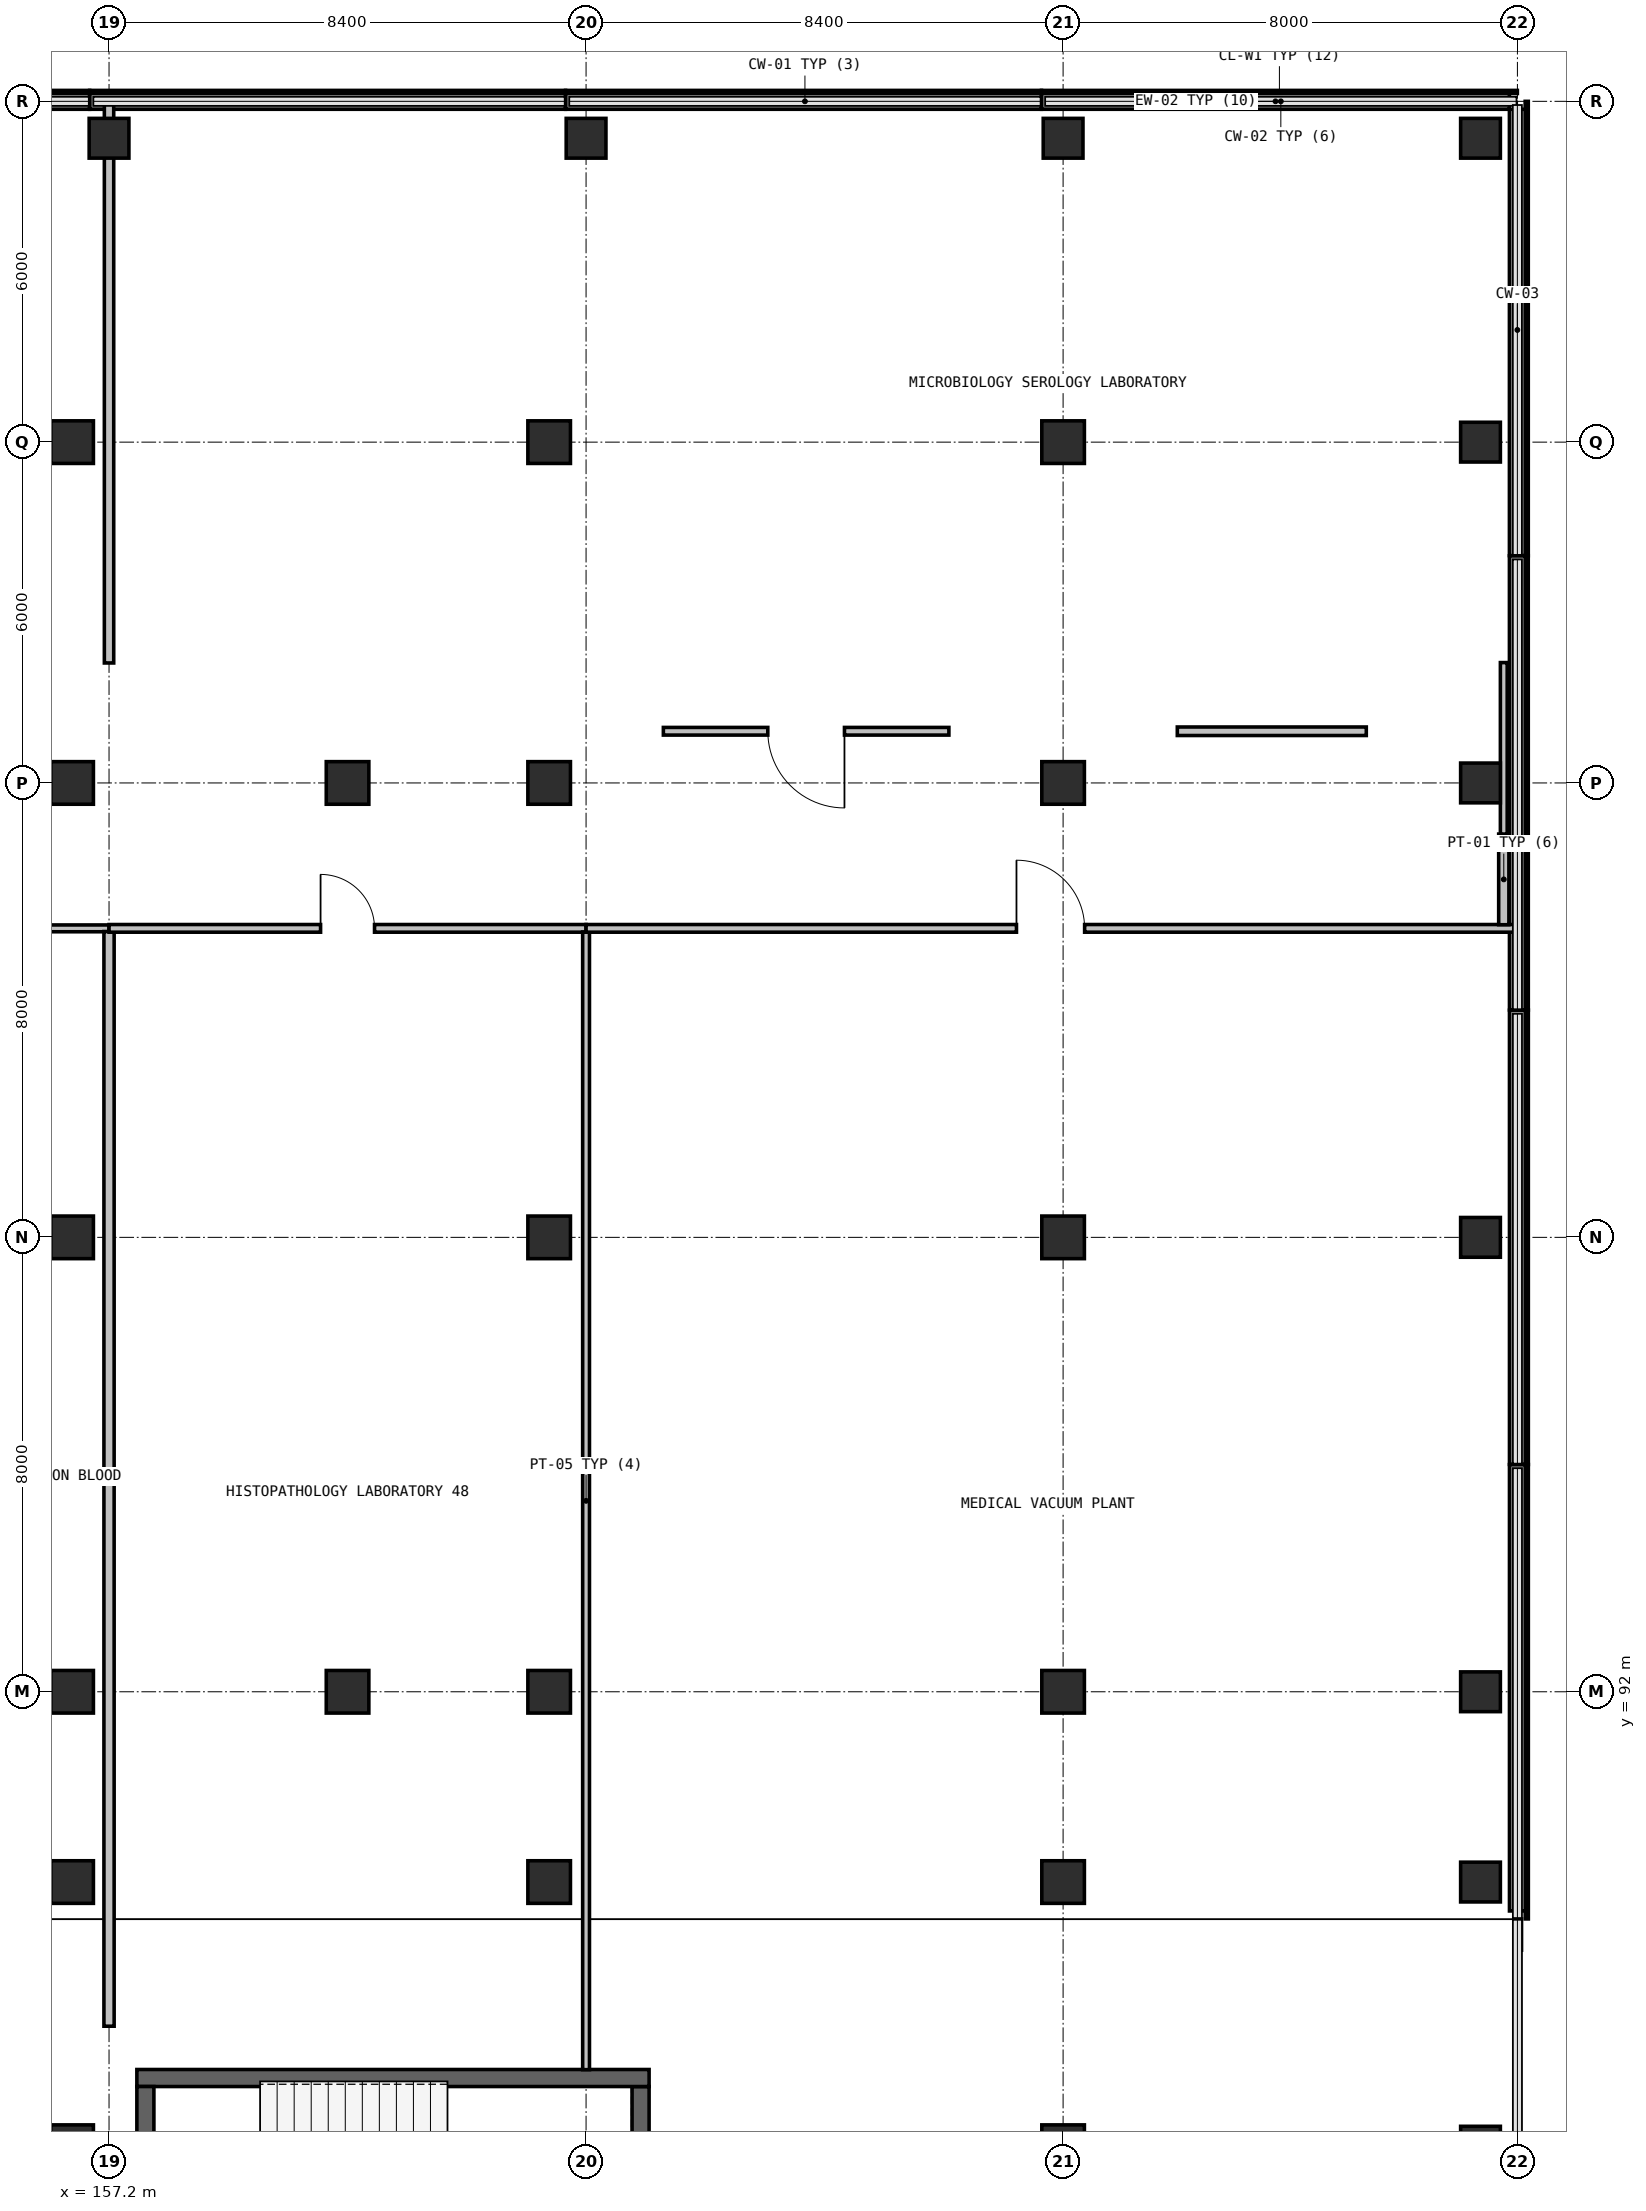
"""IFC4 building model, lengths in metres.
Left out: names, types, materials, properties, quantities, classifications, styles, units other than length and angle.
Written with IfcOpenShell. Run it as: python <this file> out.ifc"""

import sys

from ifc_helpers import new_model, si_unit, direction, frame, frame_2d, origin, origin_2d, place, context, subcontext, project, spatial, rectangle, extrude, element, fill, save


model = new_model("IFC4")
c1 = context("Model", 3, precision=1e-05, world=origin(), true_north=direction((0.0, 1.0)))
c2 = subcontext(c1, "Body", "Model", "MODEL_VIEW")
j1 = project(units=[si_unit("LENGTHUNIT", "METRE"), si_unit("PLANEANGLEUNIT", "RADIAN")], contexts=[c1])
p1 = place(None, origin())
s1 = spatial("IfcSite", under=j1, at=p1, CompositionType="ELEMENT")
p2 = place(p1, origin())
s2 = spatial("IfcBuilding", under=s1, at=p2, CompositionType="ELEMENT")
p3 = place(p2, frame((0.0, 0.0, 15.0)))
s3 = spatial("IfcBuildingStorey", under=s2, at=p3, CompositionType="ELEMENT", Elevation=15.0)
for number, where, z_axis, x_axis in (
    (1, (161.4, 92.0, 0.0), (0.0, 0.0, 1.0), (1.0, 0.0, 0.0)),
    (2, (161.4, 108.0, 0.0), (0.0, 0.0, 1.0), (1.0, 0.0, 0.0)),
):
    element("IfcColumn", number, at=place(p3, frame(where, z_axis=z_axis, x_axis=x_axis)), inside=s3, PredefinedType="COLUMN", context=c2, shape_type="SweptSolid", body=[
        extrude(rectangle(XDim=0.75, YDim=0.75, at=origin_2d()), origin(), (0.0, 0.0, 1.0), 4.2),
    ])
for number, where, z_axis, x_axis in (
    (3, (157.2, 119.35, 0.0), (0.0, 0.0, 1.0), (1.0, 0.0, 0.0)),
    (4, (165.6, 119.35, 0.0), (0.0, 0.0, 1.0), (1.0, 0.0, 0.0)),
    (5, (174.0, 119.35, 0.0), (0.0, 0.0, 1.0), (1.0, 0.0, 0.0)),
    (6, (181.35, 119.35, 0.0), (0.0, 0.0, 1.0), (1.0, 0.0, 0.0)),
):
    element("IfcColumn", number, at=place(p3, frame(where, z_axis=z_axis, x_axis=x_axis)), inside=s3, PredefinedType="COLUMN", context=c2, shape_type="SweptSolid", body=[
        extrude(rectangle(XDim=0.7, YDim=0.7, at=origin_2d()), origin(), (0.0, 0.0, 1.0), 4.2),
    ])
for number, where, z_axis, x_axis in (
    (7, (156.55, 84.0, 0.0), (0.0, 0.0, 1.0), (1.0, 0.0, 0.0)),
    (8, (156.55, 88.65, 0.0), (0.0, 0.0, 1.0), (1.0, 0.0, 0.0)),
    (9, (156.55, 92.0, 0.0), (0.0, 0.0, 1.0), (1.0, 0.0, 0.0)),
    (10, (156.55, 100.0, 0.0), (0.0, 0.0, 1.0), (1.0, 0.0, 0.0)),
    (11, (156.55, 108.0, 0.0), (0.0, 0.0, 1.0), (1.0, 0.0, 0.0)),
    (12, (156.55, 114.0, 0.0), (0.0, 0.0, 1.0), (1.0, 0.0, 0.0)),
    (13, (164.95, 88.65, 0.0), (0.0, 0.0, 1.0), (1.0, 0.0, 0.0)),
    (14, (164.95, 92.0, 0.0), (0.0, 0.0, 1.0), (1.0, 0.0, 0.0)),
    (15, (164.95, 100.0, 0.0), (0.0, 0.0, 1.0), (1.0, 0.0, 0.0)),
    (16, (164.95, 108.0, 0.0), (0.0, 0.0, 1.0), (1.0, 0.0, 0.0)),
    (17, (164.95, 114.0, 0.0), (0.0, 0.0, 1.0), (1.0, 0.0, 0.0)),
    (18, (174.0, 84.0, 0.0), (0.0, 0.0, 1.0), (1.0, 0.0, 0.0)),
    (19, (174.0, 88.65, 0.0), (0.0, 0.0, 1.0), (1.0, 0.0, 0.0)),
    (20, (174.0, 92.0, 0.0), (0.0, 0.0, 1.0), (1.0, 0.0, 0.0)),
    (21, (174.0, 100.0, 0.0), (0.0, 0.0, 1.0), (1.0, 0.0, 0.0)),
    (22, (174.0, 108.0, 0.0), (0.0, 0.0, 1.0), (1.0, 0.0, 0.0)),
    (23, (174.0, 114.0, 0.0), (0.0, 0.0, 1.0), (1.0, 0.0, 0.0)),
):
    element("IfcColumn", number, at=place(p3, frame(where, z_axis=z_axis, x_axis=x_axis)), inside=s3, PredefinedType="COLUMN", context=c2, shape_type="SweptSolid", body=[
        extrude(rectangle(XDim=0.75, YDim=0.75, at=origin_2d()), origin(), (0.0, 0.0, 1.0), 4.2),
    ])
for number, where, z_axis, x_axis in (
    (24, (181.35, 84.0, 0.0), (0.0, 0.0, 1.0), (1.0, 0.0, 0.0)),
    (25, (181.35, 88.65, 0.0), (0.0, 0.0, 1.0), (1.0, 0.0, 0.0)),
    (26, (181.35, 92.0, 0.0), (0.0, 0.0, 1.0), (1.0, 0.0, 0.0)),
    (27, (181.35, 100.0, 0.0), (0.0, 0.0, 1.0), (1.0, 0.0, 0.0)),
    (28, (181.35, 108.0, 0.0), (0.0, 0.0, 1.0), (1.0, 0.0, 0.0)),
    (29, (181.35, 114.0, 0.0), (0.0, 0.0, 1.0), (1.0, 0.0, 0.0)),
):
    element("IfcColumn", number, at=place(p3, frame(where, z_axis=z_axis, x_axis=x_axis)), inside=s3, PredefinedType="COLUMN", context=c2, shape_type="SweptSolid", body=[
        extrude(rectangle(XDim=0.7, YDim=0.7, at=origin_2d()), origin(), (0.0, 0.0, 1.0), 4.2),
    ])
for number, where, z_axis, x_axis in (
    (30, (148.481, 120.0, 0.0), (0.0, 0.0, 1.0), (1.0, 0.0, 0.0)),
    (31, (156.861, 120.0, 0.0), (0.0, 0.0, 1.0), (1.0, 0.0, 0.0)),
    (32, (165.241, 120.0, 0.0), (0.0, 0.0, 1.0), (1.0, 0.0, 0.0)),
):
    element("IfcWall", number, at=place(p3, frame(where, z_axis=z_axis, x_axis=x_axis)), inside=s3, PredefinedType="SOLIDWALL", context=c2, shape_type="SweptSolid", body=[
        extrude(rectangle(XDim=8.376, YDim=0.28, at=frame_2d((4.188, 0.0))), origin(), (0.0, 0.0, 1.0), 0.94),
    ])
p4 = place(p3, frame((173.621, 120.0, 0.0), z_axis=(0.0, 0.0, 1.0), x_axis=(1.0, 0.0, 0.0)))
e33 = element("IfcWall", 33, at=p4, inside=s3, PredefinedType="SOLIDWALL", context=c2, shape_type="SweptSolid", body=[
    extrude(rectangle(XDim=8.238, YDim=0.28, at=frame_2d((4.119, 0.0))), origin(), (0.0, 0.0, 1.0), 0.94),
])
p5 = place(p3, frame((181.999, 119.86, 0.0), z_axis=(0.0, 0.0, 1.0), x_axis=(0.0, -1.0, 0.0)))
e34 = element("IfcWall", 34, at=p5, inside=s3, PredefinedType="SOLIDWALL", context=c2, shape_type="SweptSolid", body=[
    extrude(rectangle(XDim=7.858, YDim=0.28, at=frame_2d((3.929, 0.0))), origin(), (0.0, 0.0, 1.0), 0.94),
])
p6 = place(p3, frame((181.999, 111.998, 0.0), z_axis=(0.0, 0.0, 1.0), x_axis=(0.000122144863, -0.99999999254, 0.0)))
e35 = element("IfcWall", 35, at=p6, inside=s3, PredefinedType="SOLIDWALL", context=c2, shape_type="SweptSolid", body=[
    extrude(rectangle(XDim=7.995, YDim=0.28, at=frame_2d((3.998, 0.0))), origin(), (0.0, 0.0, 1.0), 0.94),
])
p7 = place(p3, frame((182.0, 103.999, 0.0), z_axis=(0.0, 0.0, 1.0), x_axis=(0.0, -1.0, 0.0)))
e36 = element("IfcWall", 36, at=p7, inside=s3, PredefinedType="SOLIDWALL", context=c2, shape_type="SweptSolid", body=[
    extrude(rectangle(XDim=7.996, YDim=0.28, at=frame_2d((3.998, 0.0))), origin(), (0.0, 0.0, 1.0), 0.94),
])
p8 = place(p3, frame((182.0, 95.999, 0.0), z_axis=(0.0, 0.0, 1.0), x_axis=(0.0, -1.0, 0.0)))
e37 = element("IfcWall", 37, at=p8, inside=s3, PredefinedType="SOLIDWALL", context=c2, shape_type="SweptSolid", body=[
    extrude(rectangle(XDim=7.858, YDim=0.28, at=frame_2d((3.929, 0.0))), origin(), (0.0, 0.0, 1.0), 0.94),
])
p9 = place(p3, frame((166.56, 81.19, 0.0), z_axis=(0.0, 0.0, 1.0), x_axis=(0.0, 1.0, 0.0)))
e38 = element("IfcWall", 38, at=p9, inside=s3, PredefinedType="SHEAR", context=c2, shape_type="SweptSolid", body=[
    extrude(rectangle(XDim=3.86, YDim=0.3, at=frame_2d((1.93, 0.0))), origin(), (0.0, 0.0, 1.0), 3.895),
])
p10 = place(p3, frame((166.71, 85.2, 0.0), z_axis=(0.0, 0.0, 1.0), x_axis=(-1.0, 0.0, 0.0)))
e39 = element("IfcWall", 39, at=p10, inside=s3, PredefinedType="SHEAR", context=c2, shape_type="SweptSolid", body=[
    extrude(rectangle(XDim=9.02, YDim=0.3, at=frame_2d((4.51, 0.0))), origin(), (0.0, 0.0, 1.0), 3.895),
])
p11 = place(p3, frame((157.84, 85.05, 0.0), z_axis=(0.0, 0.0, 1.0), x_axis=(0.0, -1.0, 0.0)))
e40 = element("IfcWall", 40, at=p11, inside=s3, PredefinedType="SHEAR", context=c2, shape_type="SweptSolid", body=[
    extrude(rectangle(XDim=3.86, YDim=0.3, at=frame_2d((1.93, 0.0))), origin(), (0.0, 0.0, 1.0), 3.895),
])
p12 = place(p11, frame((1.38, 0.0, 0.0)))
e41 = element("IfcOpeningElement", 41, at=p12, cuts=e40, PredefinedType="OPENING", context=c2, shape_type="SweptSolid", body=[
    extrude(rectangle(XDim=1.1, YDim=2.15, at=frame_2d((0.55, 1.075))), frame((0.0, 0.16, 0.0), z_axis=(0.0, -1.0, 0.0), x_axis=(1.0, 0.0, 0.0)), (0.0, 0.0, 1.0), 0.32),
])
p13 = place(p3, frame((153.724, 105.44, 0.0), z_axis=(0.0, 0.0, 1.0), x_axis=(1.0, 0.0, 0.0)))
e42 = element("IfcWall", 42, at=p13, inside=s3, PredefinedType="PARTITIONING", context=c2, shape_type="SweptSolid", body=[
    extrude(rectangle(XDim=3.476, YDim=0.12, at=frame_2d((1.738, 0.0))), origin(), (0.0, 0.0, 1.0), 3.895),
])
p14 = place(p13, frame((1.113, 0.0, 0.0)))
e43 = element("IfcOpeningElement", 43, at=p14, cuts=e42, PredefinedType="OPENING", context=c2, shape_type="SweptSolid", body=[
    extrude(rectangle(XDim=1.25, YDim=2.15, at=frame_2d((0.625, 1.075))), frame((0.0, 0.07, 0.0), z_axis=(0.0, -1.0, 0.0), x_axis=(1.0, 0.0, 0.0)), (0.0, 0.0, 1.0), 0.14),
])
p15 = place(p3, frame((157.2, 105.384, 0.0), z_axis=(0.0, 0.0, 1.0), x_axis=(0.0, -1.0, 0.0)))
e44 = element("IfcWall", 44, at=p15, inside=s3, PredefinedType="PARTITIONING", context=c2, shape_type="SweptSolid", body=[
    extrude(rectangle(XDim=19.272, YDim=0.18, at=frame_2d((9.636, 0.0))), origin(), (0.0, 0.0, 1.0), 3.895),
])
p16 = place(p3, frame((157.2, 105.44, 0.0), z_axis=(0.0, 0.0, 1.0), x_axis=(1.0, 0.0, 0.0)))
e45 = element("IfcWall", 45, at=p16, inside=s3, PredefinedType="PARTITIONING", context=c2, shape_type="SweptSolid", body=[
    extrude(rectangle(XDim=8.4, YDim=0.135, at=frame_2d((4.2, 0.0))), origin(), (0.0, 0.0, 1.0), 3.895),
])
p17 = place(p16, frame((3.725, 0.0, 0.0)))
e46 = element("IfcOpeningElement", 46, at=p17, cuts=e45, PredefinedType="OPENING", context=c2, shape_type="SweptSolid", body=[
    extrude(rectangle(XDim=0.95, YDim=2.1, at=frame_2d((0.475, 1.05))), frame((0.0, 0.077, 0.0), z_axis=(0.0, -1.0, 0.0), x_axis=(1.0, 0.0, 0.0)), (0.0, 0.0, 1.0), 0.155),
])
p18 = place(p3, frame((165.6, 105.376, 0.0), z_axis=(0.0, 0.0, 1.0), x_axis=(0.0, -1.0, 0.0)))
e47 = element("IfcWall", 47, at=p18, inside=s3, PredefinedType="PARTITIONING", context=c2, shape_type="SweptSolid", body=[
    extrude(rectangle(XDim=20.029, YDim=0.12, at=frame_2d((10.015, 0.0))), origin(), (0.0, 0.0, 1.0), 3.895),
])
p19 = place(p3, frame((165.6, 105.44, 0.0), z_axis=(0.0, 0.0, 1.0), x_axis=(1.0, 0.0, 0.0)))
e48 = element("IfcWall", 48, at=p19, inside=s3, PredefinedType="PARTITIONING", context=c2, shape_type="SweptSolid", body=[
    extrude(rectangle(XDim=16.358, YDim=0.135, at=frame_2d((8.179, 0.0))), origin(), (0.0, 0.0, 1.0), 3.895),
])
p20 = place(p19, frame((7.579, 0.0, 0.0)))
e49 = element("IfcOpeningElement", 49, at=p20, cuts=e48, PredefinedType="OPENING", context=c2, shape_type="SweptSolid", body=[
    extrude(rectangle(XDim=1.2, YDim=2.15, at=frame_2d((0.6, 1.075))), frame((0.0, 0.077, 0.0), z_axis=(0.0, -1.0, 0.0), x_axis=(1.0, 0.0, 0.0)), (0.0, 0.0, 1.0), 0.155),
])
p21 = place(p3, frame((181.76, 105.504, 0.0), z_axis=(0.0, 0.0, 1.0), x_axis=(0.0, 1.0, 0.0)))
e50 = element("IfcWall", 50, at=p21, inside=s3, PredefinedType="PARTITIONING", context=c2, shape_type="SweptSolid", body=[
    extrude(rectangle(XDim=1.596, YDim=0.18, at=frame_2d((0.798, 0.0))), origin(), (0.0, 0.0, 1.0), 3.895),
])
p22 = place(p3, frame((157.2, 119.958, 0.0), z_axis=(0.0, 0.0, 1.0), x_axis=(0.0, -1.0, 0.0)))
e51 = element("IfcWall", 51, at=p22, inside=s3, PredefinedType="PARTITIONING", context=c2, shape_type="SweptSolid", body=[
    extrude(rectangle(XDim=9.846, YDim=0.165, at=frame_2d((4.923, 0.0))), origin(), (0.0, 0.0, 1.0), 3.895),
])
p23 = place(p3, frame((179.339, 108.91, 0.0), z_axis=(0.0, 0.0, 1.0), x_axis=(-1.0, 0.0, 0.0)))
e52 = element("IfcWall", 52, at=p23, inside=s3, PredefinedType="PARTITIONING", context=c2, shape_type="SweptSolid", body=[
    extrude(rectangle(XDim=3.328, YDim=0.15, at=frame_2d((1.664, 0.0))), origin(), (0.0, 0.0, 1.0), 3.895),
])
p24 = place(p3, frame((171.989, 108.91, 0.0), z_axis=(0.0, 0.0, 1.0), x_axis=(-1.0, 0.0, 0.0)))
e53 = element("IfcWall", 53, at=p24, inside=s3, PredefinedType="PARTITIONING", context=c2, shape_type="SweptSolid", body=[
    extrude(rectangle(XDim=5.028, YDim=0.135, at=frame_2d((2.514, 0.0))), origin(), (0.0, 0.0, 1.0), 3.895),
])
p25 = place(p24, frame((1.839, 0.0, 0.0)))
e54 = element("IfcOpeningElement", 54, at=p25, cuts=e53, PredefinedType="OPENING", context=c2, shape_type="SweptSolid", body=[
    extrude(rectangle(XDim=1.35, YDim=2.15, at=frame_2d((0.675, 1.075))), frame((0.0, 0.077, 0.0), z_axis=(0.0, -1.0, 0.0), x_axis=(1.0, 0.0, 0.0)), (0.0, 0.0, 1.0), 0.155),
])
p26 = place(p3, frame((181.76, 107.1, 0.0), z_axis=(0.0, 0.0, 1.0), x_axis=(0.0, 1.0, 0.0)))
e55 = element("IfcWall", 55, at=p26, inside=s3, PredefinedType="PARTITIONING", context=c2, shape_type="SweptSolid", body=[
    extrude(rectangle(XDim=3.019, YDim=0.12, at=frame_2d((1.509, 0.0))), origin(), (0.0, 0.0, 1.0), 3.895),
])
p27 = place(p17, origin())
e56 = element("IfcDoor", 56, at=p27, inside=s3, OperationType="SINGLE_SWING_RIGHT", PredefinedType="DOOR", context=c2, shape_type="SweptSolid", body=[
    extrude(rectangle(XDim=0.95, YDim=2.1, at=frame_2d((0.475, 1.05))), frame((0.0, 0.025, 0.0), z_axis=(0.0, -1.0, 0.0), x_axis=(1.0, 0.0, 0.0)), (0.0, 0.0, 1.0), 0.05),
])
fill(e46, e56)
p28 = place(p20, origin())
e57 = element("IfcDoor", 57, at=p28, inside=s3, OperationType="SINGLE_SWING_LEFT", PredefinedType="DOOR", context=c2, shape_type="SweptSolid", body=[
    extrude(rectangle(XDim=1.2, YDim=2.15, at=frame_2d((0.6, 1.075))), frame((0.0, 0.025, 0.0), z_axis=(0.0, -1.0, 0.0), x_axis=(1.0, 0.0, 0.0)), (0.0, 0.0, 1.0), 0.05),
])
fill(e49, e57)
p29 = place(p25, origin())
e58 = element("IfcDoor", 58, at=p29, inside=s3, OperationType="SINGLE_SWING_LEFT", PredefinedType="DOOR", context=c2, shape_type="SweptSolid", body=[
    extrude(rectangle(XDim=1.35, YDim=2.15, at=frame_2d((0.675, 1.075))), frame((0.0, 0.025, 0.0), z_axis=(0.0, -1.0, 0.0), x_axis=(1.0, 0.0, 0.0)), (0.0, 0.0, 1.0), 0.05),
])
fill(e54, e58)
save(model, sys.argv[1])
